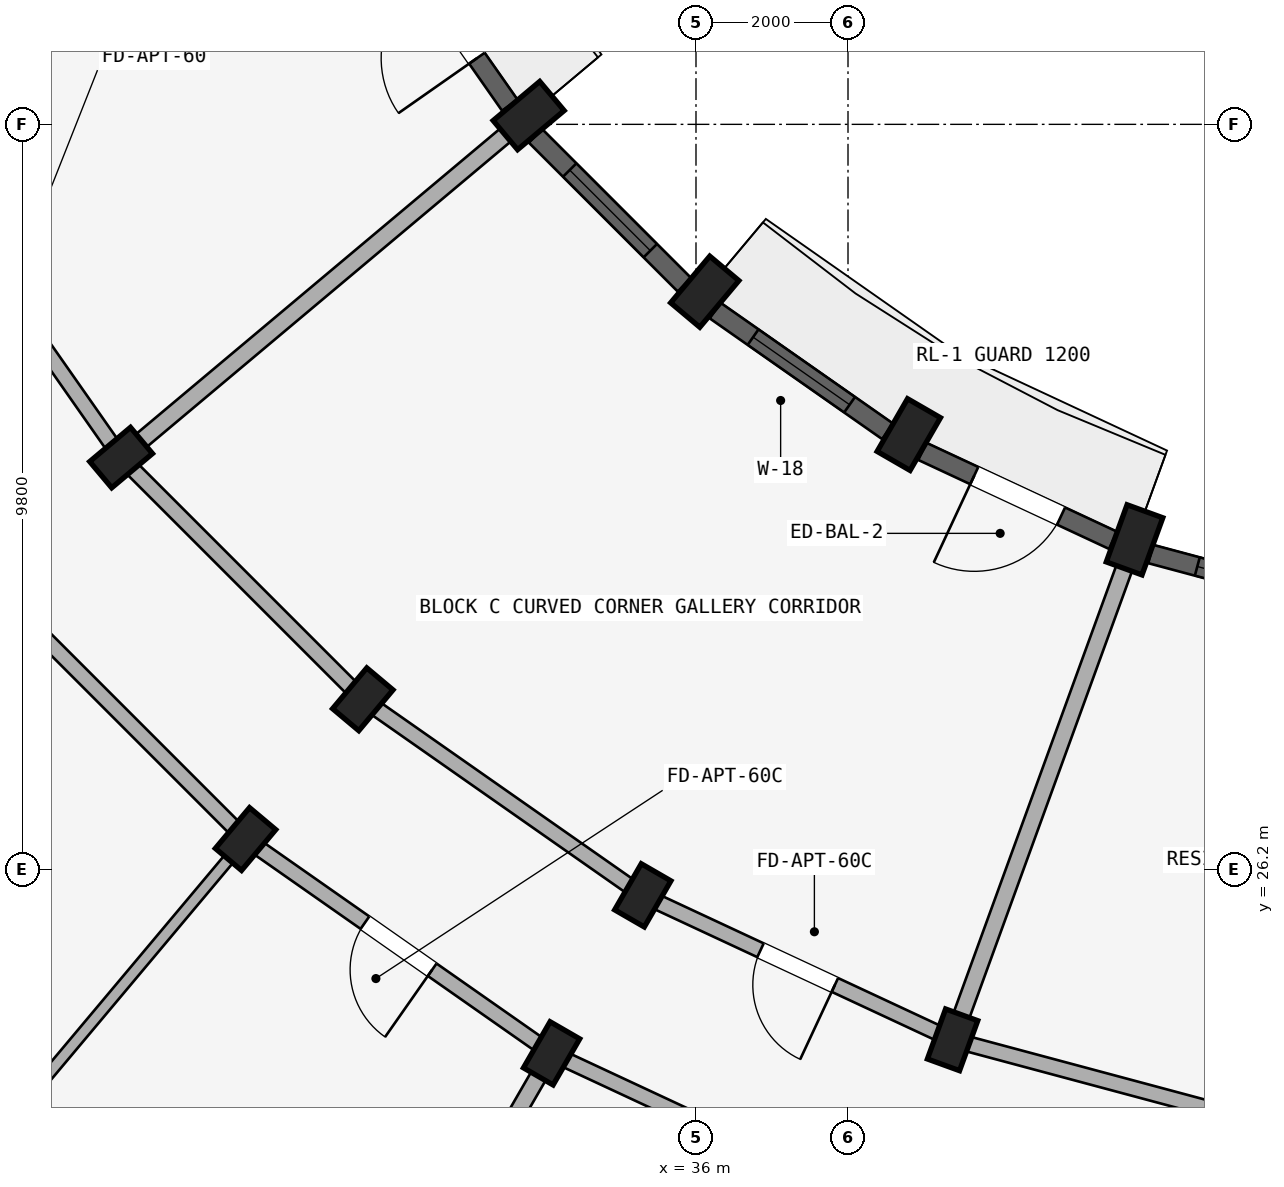
"""IFC4 building model, lengths in metres.
Left out: names, types, materials, properties, quantities, classifications, styles, units other than length and angle.
Written with IfcOpenShell. Run it as: python <this file> out.ifc"""

import sys

from ifc_helpers import new_model, si_unit, direction, frame, frame_2d, origin, origin_2d, place, context, subcontext, project, spatial, rectangle, extrude, element, fill, save


model = new_model("IFC4")
c1 = context("Model", 3, precision=1e-05, world=origin(), true_north=direction((0.0, 1.0)))
c2 = subcontext(c1, "Body", "Model", "MODEL_VIEW")
j1 = project(units=[si_unit("LENGTHUNIT", "METRE"), si_unit("PLANEANGLEUNIT", "RADIAN")], contexts=[c1])
p1 = place(None, origin())
s1 = spatial("IfcSite", under=j1, at=p1, CompositionType="ELEMENT")
p2 = place(p1, origin())
s2 = spatial("IfcBuilding", under=s1, at=p2, CompositionType="ELEMENT")
p3 = place(p2, frame((0.0, 0.0, 21.3)))
s3 = spatial("IfcBuildingStorey", under=s2, at=p3, CompositionType="ELEMENT", Elevation=21.3)
p4 = place(p3, frame((41.77, 30.534, 0.0), z_axis=(0.0, 0.0, 1.0), x_axis=(-0.939692620786, 0.342020143326, 0.0)))
e1 = element("IfcColumn", 1, at=p4, inside=s3, PredefinedType="COLUMN", context=c2, shape_type="SweptSolid", body=[
    extrude(rectangle(XDim=0.5, YDim=0.8, at=origin_2d()), origin(), (0.0, 0.0, 1.0), 2.93),
])
p5 = place(p3, frame((39.376, 23.956, 0.0), z_axis=(0.0, 0.0, 1.0), x_axis=(-0.939692620786, 0.342020143326, 0.0)))
e2 = element("IfcColumn", 2, at=p5, inside=s3, PredefinedType="COLUMN", context=c2, shape_type="SweptSolid", body=[
    extrude(rectangle(XDim=0.45, YDim=0.7, at=origin_2d()), origin(), (0.0, 0.0, 1.0), 2.93),
])
p6 = place(p3, frame((38.8, 31.919, 0.0), z_axis=(0.0, 0.0, 1.0), x_axis=(-0.866025403784, 0.5, 0.0)))
e3 = element("IfcColumn", 3, at=p6, inside=s3, PredefinedType="COLUMN", context=c2, shape_type="SweptSolid", body=[
    extrude(rectangle(XDim=0.5, YDim=0.8, at=origin_2d()), origin(), (0.0, 0.0, 1.0), 2.93),
])
for number, where, z_axis, x_axis in (
    (4, (35.3, 25.856, 0.0), (0.0, 0.0, 1.0), (-0.866, 0.5, 0.0)),
    (5, (34.1, 23.778, 0.0), (0.0, 0.0, 1.0), (-0.866, 0.5, 0.0)),
):
    element("IfcColumn", number, at=place(p3, frame(where, z_axis=z_axis, x_axis=x_axis)), inside=s3, PredefinedType="COLUMN", context=c2, shape_type="SweptSolid", body=[
        extrude(rectangle(XDim=0.45, YDim=0.7, at=origin_2d()), origin(), (0.0, 0.0, 1.0), 2.93),
    ])
p7 = place(p3, frame((36.115, 33.798, 0.0), z_axis=(0.0, 0.0, 1.0), x_axis=(-0.766044443119, 0.642787609687, 0.0)))
e6 = element("IfcColumn", 6, at=p7, inside=s3, PredefinedType="COLUMN", context=c2, shape_type="SweptSolid", body=[
    extrude(rectangle(XDim=0.5, YDim=0.8, at=origin_2d()), origin(), (0.0, 0.0, 1.0), 2.93),
])
for number, where, z_axis, x_axis in (
    (7, (31.616, 28.436, 0.0), (0.0, 0.0, 1.0), (-0.766, 0.643, 0.0)),
    (8, (30.073, 26.598, 0.0), (0.0, 0.0, 1.0), (-0.766, 0.643, 0.0)),
):
    element("IfcColumn", number, at=place(p3, frame(where, z_axis=z_axis, x_axis=x_axis)), inside=s3, PredefinedType="COLUMN", context=c2, shape_type="SweptSolid", body=[
        extrude(rectangle(XDim=0.45, YDim=0.7, at=origin_2d()), origin(), (0.0, 0.0, 1.0), 2.93),
    ])
p8 = place(p3, frame((33.798, 36.115, 0.0), z_axis=(0.0, 0.0, 1.0), x_axis=(-0.642787609687, 0.766044443119, 0.0)))
e9 = element("IfcColumn", 9, at=p8, inside=s3, PredefinedType="COLUMN", context=c2, shape_type="SweptSolid", body=[
    extrude(rectangle(XDim=0.5, YDim=0.8, at=origin_2d()), origin(), (0.0, 0.0, 1.0), 2.93),
])
p9 = place(p3, frame((28.436, 31.616, 0.0), z_axis=(0.0, 0.0, 1.0), x_axis=(-0.642787609687, 0.766044443119, 0.0)))
e10 = element("IfcColumn", 10, at=p9, inside=s3, PredefinedType="COLUMN", context=c2, shape_type="SweptSolid", body=[
    extrude(rectangle(XDim=0.45, YDim=0.7, at=origin_2d()), origin(), (0.0, 0.0, 1.0), 2.93),
])
p10 = place(p3, frame((43.72, 22.792, 0.0), z_axis=(0.0, 0.0, 1.0), x_axis=(-0.965934240054, 0.258787642463, 0.0)))
e11 = element("IfcWall", 11, at=p10, inside=s3, PredefinedType="STANDARD", context=c2, shape_type="SweptSolid", body=[
    extrude(rectangle(XDim=4.497, YDim=0.2, at=frame_2d((2.249, 0.0))), origin(), (0.0, 0.0, 1.0), 2.372),
])
p11 = place(p3, frame((39.376, 23.956, 0.0), z_axis=(0.0, 0.0, 1.0), x_axis=(-0.906307919131, 0.422617978463, 0.0)))
e12 = element("IfcWall", 12, at=p11, inside=s3, PredefinedType="STANDARD", context=c2, shape_type="SweptSolid", body=[
    extrude(rectangle(XDim=4.497, YDim=0.2, at=frame_2d((2.249, 0.0))), origin(), (0.0, 0.0, 1.0), 2.372),
])
p12 = place(p11, frame((1.709, 0.0, 0.0)))
e13 = element("IfcOpeningElement", 13, at=p12, cuts=e12, PredefinedType="OPENING", context=c2, shape_type="SweptSolid", body=[
    extrude(rectangle(XDim=1.08, YDim=2.15, at=frame_2d((0.54, 1.075))), frame((0.0, 0.11, 0.0), z_axis=(0.0, -1.0, 0.0), x_axis=(1.0, 0.0, 0.0)), (0.0, 0.0, 1.0), 0.22),
])
p13 = place(p3, frame((38.555, 21.701, 0.0), z_axis=(0.0, 0.0, 1.0), x_axis=(-0.906302381024, 0.422629854778, 0.0)))
e14 = element("IfcWall", 14, at=p13, inside=s3, PredefinedType="STANDARD", context=c2, shape_type="SweptSolid", body=[
    extrude(rectangle(XDim=4.915, YDim=0.2, at=frame_2d((2.458, 0.0))), origin(), (0.0, 0.0, 1.0), 2.372),
])
p14 = place(p3, frame((35.3, 25.856, 0.0), z_axis=(0.0, 0.0, 1.0), x_axis=(-0.819155404658, 0.573571637217, 0.0)))
e15 = element("IfcWall", 15, at=p14, inside=s3, PredefinedType="STANDARD", context=c2, shape_type="SweptSolid", body=[
    extrude(rectangle(XDim=4.497, YDim=0.2, at=frame_2d((2.249, 0.0))), origin(), (0.0, 0.0, 1.0), 2.372),
])
p15 = place(p3, frame((34.1, 23.778, 0.0), z_axis=(0.0, 0.0, 1.0), x_axis=(-0.819140911474, 0.573592335331, 0.0)))
e16 = element("IfcWall", 16, at=p15, inside=s3, PredefinedType="STANDARD", context=c2, shape_type="SweptSolid", body=[
    extrude(rectangle(XDim=4.916, YDim=0.2, at=frame_2d((2.458, 0.0))), origin(), (0.0, 0.0, 1.0), 2.372),
])
p16 = place(p15, frame((1.918, 0.0, 0.0)))
e17 = element("IfcOpeningElement", 17, at=p16, cuts=e16, PredefinedType="OPENING", context=c2, shape_type="SweptSolid", body=[
    extrude(rectangle(XDim=1.08, YDim=2.15, at=frame_2d((0.54, 1.075))), frame((0.0, 0.11, 0.0), z_axis=(0.0, -1.0, 0.0), x_axis=(1.0, 0.0, 0.0)), (0.0, 0.0, 1.0), 0.22),
])
p17 = place(p3, frame((31.616, 28.436, 0.0), z_axis=(0.0, 0.0, 1.0), x_axis=(-0.707106781187, 0.707106781187, 0.0)))
e18 = element("IfcWall", 18, at=p17, inside=s3, PredefinedType="STANDARD", context=c2, shape_type="SweptSolid", body=[
    extrude(rectangle(XDim=4.497, YDim=0.2, at=frame_2d((2.249, 0.0))), origin(), (0.0, 0.0, 1.0), 2.372),
])
p18 = place(p3, frame((30.073, 26.598, 0.0), z_axis=(0.0, 0.0, 1.0), x_axis=(-0.707106781187, 0.707106781187, 0.0)))
e19 = element("IfcWall", 19, at=p18, inside=s3, PredefinedType="STANDARD", context=c2, shape_type="SweptSolid", body=[
    extrude(rectangle(XDim=4.916, YDim=0.2, at=frame_2d((2.458, 0.0))), origin(), (0.0, 0.0, 1.0), 2.372),
])
p19 = place(p3, frame((28.436, 31.616, 0.0), z_axis=(0.0, 0.0, 1.0), x_axis=(-0.573571637217, 0.819155404658, 0.0)))
e20 = element("IfcWall", 20, at=p19, inside=s3, PredefinedType="STANDARD", context=c2, shape_type="SweptSolid", body=[
    extrude(rectangle(XDim=4.497, YDim=0.2, at=frame_2d((2.249, 0.0))), origin(), (0.0, 0.0, 1.0), 2.372),
])
p20 = place(p19, frame((1.749, 0.0, 0.0)))
e21 = element("IfcOpeningElement", 21, at=p20, cuts=e20, PredefinedType="OPENING", context=c2, shape_type="SweptSolid", body=[
    extrude(rectangle(XDim=1.0, YDim=2.15, at=frame_2d((0.5, 1.075))), frame((0.0, 0.11, 0.0), z_axis=(0.0, -1.0, 0.0), x_axis=(1.0, 0.0, 0.0)), (0.0, 0.0, 1.0), 0.22),
])
p21 = place(p3, frame((41.702, 30.346, 0.0), z_axis=(0.0, 0.0, 1.0), x_axis=(-0.342010221662, -0.939696231917, 0.0)))
e22 = element("IfcWall", 22, at=p21, inside=s3, PredefinedType="STANDARD", context=c2, shape_type="SweptSolid", body=[
    extrude(rectangle(XDim=6.75, YDim=0.22, at=frame_2d((3.375, 0.0))), origin(), (0.0, 0.0, 1.0), 2.372),
])
p22 = place(p3, frame((34.05, 23.691, 0.0), z_axis=(0.0, 0.0, 1.0), x_axis=(-0.500007702989, -0.866020956416, 0.0)))
e23 = element("IfcWall", 23, at=p22, inside=s3, PredefinedType="STANDARD", context=c2, shape_type="SweptSolid", body=[
    extrude(rectangle(XDim=14.62, YDim=0.22, at=frame_2d((7.31, 0.0))), origin(), (0.0, 0.0, 1.0), 2.372),
])
p23 = place(p3, frame((30.009, 26.521, 0.0), z_axis=(0.0, 0.0, 1.0), x_axis=(-0.642779216656, -0.76605148563, 0.0)))
e24 = element("IfcWall", 24, at=p23, inside=s3, PredefinedType="PARTITIONING", context=c2, shape_type="SweptSolid", body=[
    extrude(rectangle(XDim=14.62, YDim=0.15, at=frame_2d((7.31, 0.0))), origin(), (0.0, 0.0, 1.0), 2.372),
])
p24 = place(p23, frame((4.449, 0.0, 0.0)))
e25 = element("IfcOpeningElement", 25, at=p24, cuts=e24, PredefinedType="OPENING", context=c2, shape_type="SweptSolid", body=[
    extrude(rectangle(XDim=0.8, YDim=2.1, at=frame_2d((0.4, 1.05))), frame((0.0, 0.085, 0.0), z_axis=(0.0, -1.0, 0.0), x_axis=(1.0, 0.0, 0.0)), (0.0, 0.0, 1.0), 0.17),
])
p25 = place(p3, frame((33.645, 35.987, 0.0), z_axis=(0.0, 0.0, 1.0), x_axis=(-0.766046761698, -0.642784846501, 0.0)))
e26 = element("IfcWall", 26, at=p25, inside=s3, PredefinedType="STANDARD", context=c2, shape_type="SweptSolid", body=[
    extrude(rectangle(XDim=6.75, YDim=0.22, at=frame_2d((3.375, 0.0))), origin(), (0.0, 0.0, 1.0), 2.372),
])
p26 = place(p3, frame((44.658, 29.631, 0.0), z_axis=(0.0, 0.0, 1.0), x_axis=(-0.965935855992, 0.25878161084, 0.0)))
e27 = element("IfcWall", 27, at=p26, inside=s3, PredefinedType="STANDARD", context=c2, shape_type="SweptSolid", body=[
    extrude(rectangle(XDim=2.77, YDim=0.25, at=frame_2d((1.385, 0.0))), origin(), (0.0, 0.0, 1.0), 2.472),
])
p27 = place(p26, frame((0.635, 0.0, 0.622)))
e28 = element("IfcOpeningElement", 28, at=p27, cuts=e27, PredefinedType="OPENING", context=c2, shape_type="SweptSolid", body=[
    extrude(rectangle(XDim=1.5, YDim=1.65, at=frame_2d((0.75, 0.825))), frame((0.0, 0.135, 0.0), z_axis=(0.0, -1.0, 0.0), x_axis=(1.0, 0.0, 0.0)), (0.0, 0.0, 1.0), 0.27),
])
p28 = place(p3, frame((41.487, 30.528, 0.0), z_axis=(0.0, 0.0, 1.0), x_axis=(-0.906293449611, 0.422649007088, 0.0)))
e29 = element("IfcWall", 29, at=p28, inside=s3, PredefinedType="STANDARD", context=c2, shape_type="SweptSolid", body=[
    extrude(rectangle(XDim=2.77, YDim=0.25, at=frame_2d((1.385, 0.0))), origin(), (0.0, 0.0, 1.0), 2.472),
])
p29 = place(p28, frame((0.755, 0.0, 0.0)))
e30 = element("IfcOpeningElement", 30, at=p29, cuts=e29, PredefinedType="OPENING", context=c2, shape_type="SweptSolid", body=[
    extrude(rectangle(XDim=1.26, YDim=2.15, at=frame_2d((0.63, 1.075))), frame((0.0, 0.135, 0.0), z_axis=(0.0, -1.0, 0.0), x_axis=(1.0, 0.0, 0.0)), (0.0, 0.0, 1.0), 0.27),
])
p30 = place(p3, frame((38.521, 31.962, 0.0), z_axis=(0.0, 0.0, 1.0), x_axis=(-0.819111815273, 0.573633885053, 0.0)))
e31 = element("IfcWall", 31, at=p30, inside=s3, PredefinedType="STANDARD", context=c2, shape_type="SweptSolid", body=[
    extrude(rectangle(XDim=2.77, YDim=0.25, at=frame_2d((1.385, 0.0))), origin(), (0.0, 0.0, 1.0), 2.472),
])
p31 = place(p30, frame((0.61, 0.0, 0.672)))
e32 = element("IfcOpeningElement", 32, at=p31, cuts=e31, PredefinedType="OPENING", context=c2, shape_type="SweptSolid", body=[
    extrude(rectangle(XDim=1.55, YDim=1.6, at=frame_2d((0.775, 0.8))), frame((0.0, 0.135, 0.0), z_axis=(0.0, -1.0, 0.0), x_axis=(1.0, 0.0, 0.0)), (0.0, 0.0, 1.0), 0.27),
])
p32 = place(p3, frame((35.848, 33.889, 0.0), z_axis=(0.0, 0.0, 1.0), x_axis=(-0.707106781187, 0.707106781187, 0.0)))
e33 = element("IfcWall", 33, at=p32, inside=s3, PredefinedType="STANDARD", context=c2, shape_type="SweptSolid", body=[
    extrude(rectangle(XDim=2.77, YDim=0.25, at=frame_2d((1.385, 0.0))), origin(), (0.0, 0.0, 1.0), 2.472),
])
p33 = place(p32, frame((0.635, 0.0, 0.622)))
e34 = element("IfcOpeningElement", 34, at=p33, cuts=e33, PredefinedType="OPENING", context=c2, shape_type="SweptSolid", body=[
    extrude(rectangle(XDim=1.5, YDim=1.65, at=frame_2d((0.75, 0.825))), frame((0.0, 0.135, 0.0), z_axis=(0.0, -1.0, 0.0), x_axis=(1.0, 0.0, 0.0)), (0.0, 0.0, 1.0), 0.27),
])
p34 = place(p3, frame((33.551, 36.252, 0.0), z_axis=(0.0, 0.0, 1.0), x_axis=(-0.573633885053, 0.819111815273, 0.0)))
e35 = element("IfcWall", 35, at=p34, inside=s3, PredefinedType="STANDARD", context=c2, shape_type="SweptSolid", body=[
    extrude(rectangle(XDim=2.77, YDim=0.25, at=frame_2d((1.385, 0.0))), origin(), (0.0, 0.0, 1.0), 2.472),
])
p35 = place(p34, frame((0.755, 0.0, 0.0)))
e36 = element("IfcOpeningElement", 36, at=p35, cuts=e35, PredefinedType="OPENING", context=c2, shape_type="SweptSolid", body=[
    extrude(rectangle(XDim=1.26, YDim=2.15, at=frame_2d((0.63, 1.075))), frame((0.0, 0.135, 0.0), z_axis=(0.0, -1.0, 0.0), x_axis=(1.0, 0.0, 0.0)), (0.0, 0.0, 1.0), 0.27),
])
p36 = place(p27, origin())
e37 = element("IfcWindow", 37, at=p36, inside=s3, PartitioningType="DOUBLE_PANEL_VERTICAL", PredefinedType="WINDOW", context=c2, shape_type="SweptSolid", body=[
    extrude(rectangle(XDim=1.5, YDim=1.65, at=frame_2d((0.75, 0.825))), frame((0.0, 0.03, 0.0), z_axis=(0.0, -1.0, 0.0), x_axis=(1.0, 0.0, 0.0)), (0.0, 0.0, 1.0), 0.06),
])
fill(e28, e37)
p37 = place(p31, origin())
e38 = element("IfcWindow", 38, at=p37, inside=s3, PartitioningType="DOUBLE_PANEL_VERTICAL", PredefinedType="WINDOW", context=c2, shape_type="SweptSolid", body=[
    extrude(rectangle(XDim=1.55, YDim=1.6, at=frame_2d((0.775, 0.8))), frame((0.0, 0.03, 0.0), z_axis=(0.0, -1.0, 0.0), x_axis=(1.0, 0.0, 0.0)), (0.0, 0.0, 1.0), 0.06),
])
fill(e32, e38)
p38 = place(p33, origin())
e39 = element("IfcWindow", 39, at=p38, inside=s3, PartitioningType="DOUBLE_PANEL_VERTICAL", PredefinedType="WINDOW", context=c2, shape_type="SweptSolid", body=[
    extrude(rectangle(XDim=1.5, YDim=1.65, at=frame_2d((0.75, 0.825))), frame((0.0, 0.03, 0.0), z_axis=(0.0, -1.0, 0.0), x_axis=(1.0, 0.0, 0.0)), (0.0, 0.0, 1.0), 0.06),
])
fill(e34, e39)
p39 = place(p16, frame((1.08, 0.0, 0.0), z_axis=(0.0, 0.0, 1.0), x_axis=(-1.0, 0.0, 0.0)))
e40 = element("IfcDoor", 40, at=p39, inside=s3, OperationType="SINGLE_SWING_RIGHT", PredefinedType="DOOR", context=c2, shape_type="SweptSolid", body=[
    extrude(rectangle(XDim=1.08, YDim=2.15, at=frame_2d((0.54, 1.075))), frame((0.0, 0.025, 0.0), z_axis=(0.0, -1.0, 0.0), x_axis=(1.0, 0.0, 0.0)), (0.0, 0.0, 1.0), 0.05),
])
fill(e17, e40)
p40 = place(p12, origin())
e41 = element("IfcDoor", 41, at=p40, inside=s3, OperationType="SINGLE_SWING_LEFT", PredefinedType="DOOR", context=c2, shape_type="SweptSolid", body=[
    extrude(rectangle(XDim=1.08, YDim=2.15, at=frame_2d((0.54, 1.075))), frame((0.0, 0.025, 0.0), z_axis=(0.0, -1.0, 0.0), x_axis=(1.0, 0.0, 0.0)), (0.0, 0.0, 1.0), 0.05),
])
fill(e13, e41)
p41 = place(p29, frame((1.26, 0.0, 0.0), z_axis=(0.0, 0.0, 1.0), x_axis=(-1.0, 0.0, 0.0)))
e42 = element("IfcDoor", 42, at=p41, inside=s3, OperationType="SINGLE_SWING_LEFT", PredefinedType="DOOR", context=c2, shape_type="SweptSolid", body=[
    extrude(rectangle(XDim=1.26, YDim=2.15, at=frame_2d((0.63, 1.075))), frame((0.0, 0.025, 0.0), z_axis=(0.0, -1.0, 0.0), x_axis=(1.0, 0.0, 0.0)), (0.0, 0.0, 1.0), 0.05),
])
fill(e30, e42)
p42 = place(p35, frame((1.26, 0.0, 0.0), z_axis=(0.0, 0.0, 1.0), x_axis=(-1.0, 0.0, 0.0)))
e43 = element("IfcDoor", 43, at=p42, inside=s3, OperationType="SINGLE_SWING_RIGHT", PredefinedType="DOOR", context=c2, shape_type="SweptSolid", body=[
    extrude(rectangle(XDim=1.26, YDim=2.15, at=frame_2d((0.63, 1.075))), frame((0.0, 0.025, 0.0), z_axis=(0.0, -1.0, 0.0), x_axis=(1.0, 0.0, 0.0)), (0.0, 0.0, 1.0), 0.05),
])
fill(e36, e43)
save(model, sys.argv[1])
